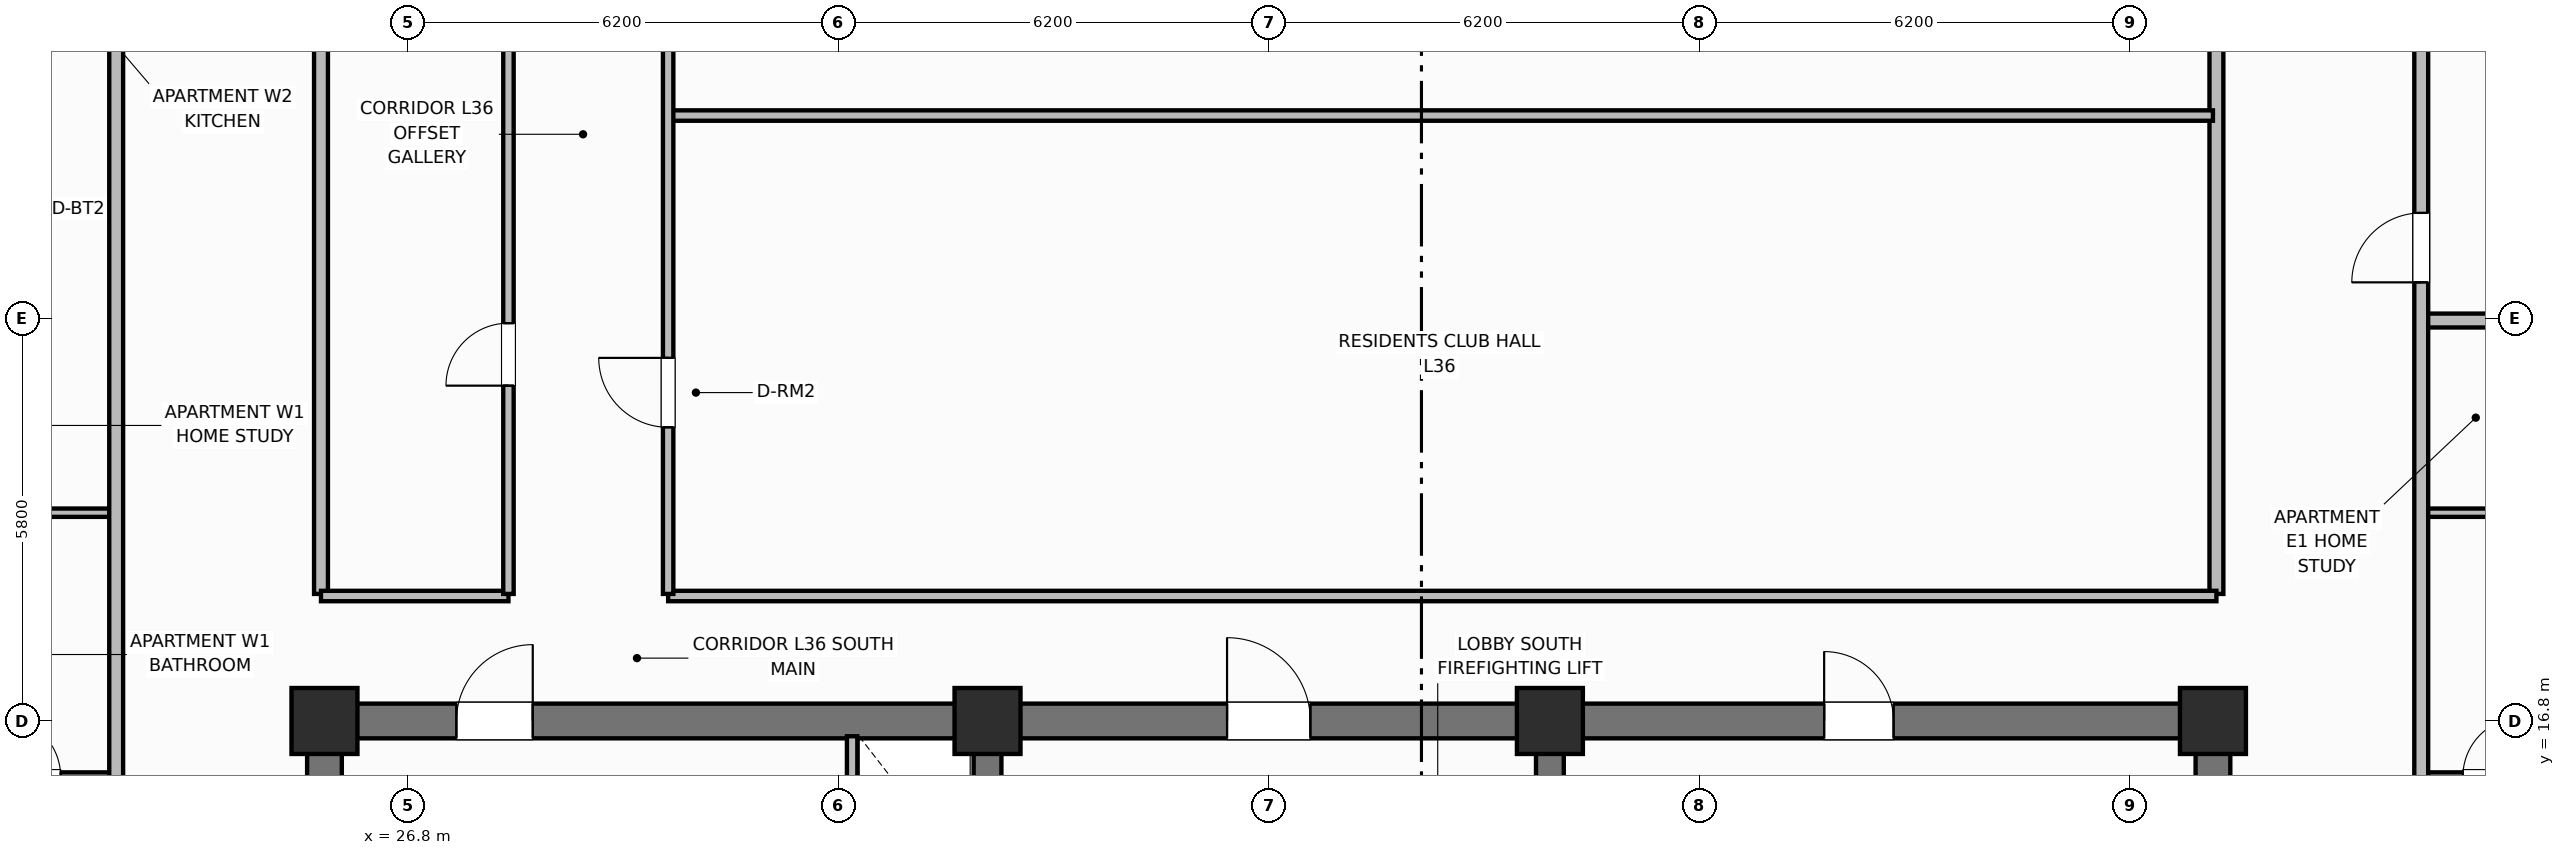
"""IFC4 building model, lengths in metres.
Left out: names, types, materials, properties, quantities, classifications, styles, units other than length and angle.
Written with IfcOpenShell. Run it as: python <this file> out.ifc"""

import sys

from ifc_helpers import new_model, si_unit, direction, frame, frame_2d, origin, origin_2d, place, context, subcontext, project, spatial, rectangle, extrude, element, fill, save


model = new_model("IFC4")
c1 = context("Model", 3, precision=1e-05, world=origin(), true_north=direction((0.0, 1.0)))
c2 = subcontext(c1, "Body", "Model", "MODEL_VIEW")
j1 = project(units=[si_unit("LENGTHUNIT", "METRE"), si_unit("PLANEANGLEUNIT", "RADIAN")], contexts=[c1])
p1 = place(None, origin())
s1 = spatial("IfcSite", under=j1, at=p1, CompositionType="ELEMENT")
p2 = place(p1, origin())
s2 = spatial("IfcBuilding", under=s1, at=p2, CompositionType="ELEMENT")
p3 = place(p2, frame((0.0, 0.0, 147.8)))
s3 = spatial("IfcBuildingStorey", under=s2, at=p3, CompositionType="ELEMENT", Elevation=147.8)
for number, where, z_axis, x_axis in (
    (1, (25.6, 10.85, 0.0), (0.0, 0.0, 1.0), (0.0, 1.0, 0.0)),
    (2, (52.8, 10.85, 0.0), (0.0, 0.0, 1.0), (0.0, 1.0, 0.0)),
):
    element("IfcWall", number, at=place(p3, frame(where, z_axis=z_axis, x_axis=x_axis)), inside=s3, PredefinedType="SHEAR", context=c2, shape_type="SweptSolid", body=[
        extrude(rectangle(XDim=5.7, YDim=0.5, at=frame_2d((2.85, 0.0))), origin(), (0.0, 0.0, 1.0), 3.7),
    ])
p4 = place(p3, frame((25.6, 16.8, 0.0), z_axis=(0.0, 0.0, 1.0), x_axis=(1.0, 0.0, 0.0)))
e3 = element("IfcWall", 3, at=p4, inside=s3, PredefinedType="SHEAR", context=c2, shape_type="SweptSolid", body=[
    extrude(rectangle(XDim=27.2, YDim=0.5, at=frame_2d((13.6, 0.0))), origin(), (0.0, 0.0, 1.0), 3.7),
])
p5 = place(p4, frame((1.9, 0.0, 0.0)))
e4 = element("IfcOpeningElement", 4, at=p5, cuts=e3, PredefinedType="OPENING", context=c2, shape_type="SweptSolid", body=[
    extrude(rectangle(XDim=1.1, YDim=2.15, at=frame_2d((0.55, 1.075))), frame((0.0, 0.26, 0.0), z_axis=(0.0, -1.0, 0.0), x_axis=(1.0, 0.0, 0.0)), (0.0, 0.0, 1.0), 0.52),
])
p6 = place(p4, frame((13.0, 0.0, 0.0)))
e5 = element("IfcOpeningElement", 5, at=p6, cuts=e3, PredefinedType="OPENING", context=c2, shape_type="SweptSolid", body=[
    extrude(rectangle(XDim=1.2, YDim=2.15, at=frame_2d((0.6, 1.075))), frame((0.0, 0.26, 0.0), z_axis=(0.0, -1.0, 0.0), x_axis=(1.0, 0.0, 0.0)), (0.0, 0.0, 1.0), 0.52),
])
p7 = place(p4, frame((21.6, 0.0, 0.0)))
e6 = element("IfcOpeningElement", 6, at=p7, cuts=e3, PredefinedType="OPENING", context=c2, shape_type="SweptSolid", body=[
    extrude(rectangle(XDim=1.0, YDim=2.15, at=frame_2d((0.5, 1.075))), frame((0.0, 0.26, 0.0), z_axis=(0.0, -1.0, 0.0), x_axis=(1.0, 0.0, 0.0)), (0.0, 0.0, 1.0), 0.52),
])
for number, where, z_axis, x_axis in (
    (7, (35.15, 10.85, 0.0), (0.0, 0.0, 1.0), (0.0, 1.0, 0.0)),
    (8, (43.25, 10.85, 0.0), (0.0, 0.0, 1.0), (0.0, 1.0, 0.0)),
):
    element("IfcWall", number, at=place(p3, frame(where, z_axis=z_axis, x_axis=x_axis)), inside=s3, PredefinedType="SHEAR", context=c2, shape_type="SweptSolid", body=[
        extrude(rectangle(XDim=5.7, YDim=0.4, at=frame_2d((2.85, 0.0))), origin(), (0.0, 0.0, 1.0), 3.7),
    ])
for number, where, z_axis, x_axis in (
    (9, (25.6, 16.8, 0.0), (0.0, 0.0, 1.0), (1.0, 0.0, 0.0)),
    (10, (35.15, 16.8, 0.0), (0.0, 0.0, 1.0), (1.0, 0.0, 0.0)),
    (11, (43.25, 16.8, 0.0), (0.0, 0.0, 1.0), (1.0, 0.0, 0.0)),
    (12, (52.8, 16.8, 0.0), (0.0, 0.0, 1.0), (1.0, 0.0, 0.0)),
):
    element("IfcColumn", number, at=place(p3, frame(where, z_axis=z_axis, x_axis=x_axis)), inside=s3, PredefinedType="COLUMN", context=c2, shape_type="SweptSolid", body=[
        extrude(rectangle(XDim=0.95, YDim=0.95, at=origin_2d()), origin(), (0.0, 0.0, 1.0), 3.7),
    ])
p8 = place(p3, frame((33.2, 14.5, 0.0), z_axis=(0.0, 0.0, 1.0), x_axis=(0.0, 1.0, 0.0)))
e13 = element("IfcWall", 13, at=p8, inside=s3, PredefinedType="PARTITIONING", context=c2, shape_type="SweptSolid", body=[
    extrude(rectangle(XDim=2.08, YDim=0.15, at=frame_2d((1.04, 0.0))), origin(), (0.0, 0.0, 1.0), 2.55),
])
p9 = place(p8, frame((0.55, 0.0, 0.0)))
e14 = element("IfcOpeningElement", 14, at=p9, cuts=e13, PredefinedType="OPENING", context=c2, shape_type="SweptSolid", body=[
    extrude(rectangle(XDim=0.85, YDim=2.05, at=frame_2d((0.425, 1.025))), frame((0.0, 0.085, 0.0), z_axis=(0.0, -1.0, 0.0), x_axis=(1.0, 0.0, 0.0)), (0.0, 0.0, 1.0), 0.17),
])
for number, where, z_axis, x_axis in (
    (15, (25.55, 18.63, 0.0), (0.0, 0.0, 1.0), (0.0, 1.0, 0.0)),
    (16, (52.85, 18.63, 0.0), (0.0, 0.0, 1.0), (0.0, 1.0, 0.0)),
):
    element("IfcWall", number, at=place(p3, frame(where, z_axis=z_axis, x_axis=x_axis)), inside=s3, PredefinedType="PARTITIONING", context=c2, shape_type="SweptSolid", body=[
        extrude(rectangle(XDim=19.14, YDim=0.2, at=frame_2d((9.57, 0.0))), origin(), (0.0, 0.0, 1.0), 2.55),
    ])
p10 = place(p3, frame((25.55, 18.6, 0.0), z_axis=(0.0, 0.0, 1.0), x_axis=(1.0, 0.0, 0.0)))
e17 = element("IfcWall", 17, at=p10, inside=s3, PredefinedType="PARTITIONING", context=c2, shape_type="SweptSolid", body=[
    extrude(rectangle(XDim=2.7, YDim=0.15, at=frame_2d((1.35, 0.0))), origin(), (0.0, 0.0, 1.0), 2.55),
])
p11 = place(p3, frame((30.55, 18.6, 0.0), z_axis=(0.0, 0.0, 1.0), x_axis=(1.0, 0.0, 0.0)))
e18 = element("IfcWall", 18, at=p11, inside=s3, PredefinedType="PARTITIONING", context=c2, shape_type="SweptSolid", body=[
    extrude(rectangle(XDim=22.3, YDim=0.15, at=frame_2d((11.15, 0.0))), origin(), (0.0, 0.0, 1.0), 2.55),
])
p12 = place(p3, frame((30.58, 25.521, 0.0), z_axis=(0.0, 0.0, 1.0), x_axis=(1.0, 0.0, 0.0)))
e19 = element("IfcWall", 19, at=p12, inside=s3, PredefinedType="PARTITIONING", context=c2, shape_type="SweptSolid", body=[
    extrude(rectangle(XDim=22.22, YDim=0.15, at=frame_2d((11.11, 0.0))), origin(), (0.0, 0.0, 1.0), 2.55),
])
p13 = place(p3, frame((28.25, 18.63, 0.0), z_axis=(0.0, 0.0, 1.0), x_axis=(0.0, 1.0, 0.0)))
e20 = element("IfcWall", 20, at=p13, inside=s3, PredefinedType="PARTITIONING", context=c2, shape_type="SweptSolid", body=[
    extrude(rectangle(XDim=19.14, YDim=0.15, at=frame_2d((9.57, 0.0))), origin(), (0.0, 0.0, 1.0), 2.55),
])
p14 = place(p13, frame((3.0, 0.0, 0.0)))
e21 = element("IfcOpeningElement", 21, at=p14, cuts=e20, PredefinedType="OPENING", context=c2, shape_type="SweptSolid", body=[
    extrude(rectangle(XDim=0.9, YDim=2.1, at=frame_2d((0.45, 1.05))), frame((0.0, 0.085, 0.0), z_axis=(0.0, -1.0, 0.0), x_axis=(1.0, 0.0, 0.0)), (0.0, 0.0, 1.0), 0.17),
])
p15 = place(p13, frame((11.5, 0.0, 0.0)))
e22 = element("IfcOpeningElement", 22, at=p15, cuts=e20, PredefinedType="OPENING", context=c2, shape_type="SweptSolid", body=[
    extrude(rectangle(XDim=0.9, YDim=2.1, at=frame_2d((0.45, 1.05))), frame((0.0, 0.085, 0.0), z_axis=(0.0, -1.0, 0.0), x_axis=(1.0, 0.0, 0.0)), (0.0, 0.0, 1.0), 0.17),
])
p16 = place(p3, frame((30.55, 18.63, 0.0), z_axis=(0.0, 0.0, 1.0), x_axis=(0.0, 1.0, 0.0)))
e23 = element("IfcWall", 23, at=p16, inside=s3, PredefinedType="PARTITIONING", context=c2, shape_type="SweptSolid", body=[
    extrude(rectangle(XDim=19.14, YDim=0.15, at=frame_2d((9.57, 0.0))), origin(), (0.0, 0.0, 1.0), 2.55),
])
p17 = place(p16, frame((2.4, 0.0, 0.0)))
e24 = element("IfcOpeningElement", 24, at=p17, cuts=e23, PredefinedType="OPENING", context=c2, shape_type="SweptSolid", body=[
    extrude(rectangle(XDim=1.0, YDim=2.15, at=frame_2d((0.5, 1.075))), frame((0.0, 0.085, 0.0), z_axis=(0.0, -1.0, 0.0), x_axis=(1.0, 0.0, 0.0)), (0.0, 0.0, 1.0), 0.17),
])
p18 = place(p16, frame((8.89, 0.0, 0.0)))
e25 = element("IfcOpeningElement", 25, at=p18, cuts=e23, PredefinedType="OPENING", context=c2, shape_type="SweptSolid", body=[
    extrude(rectangle(XDim=1.0, YDim=2.15, at=frame_2d((0.5, 1.075))), frame((0.0, 0.085, 0.0), z_axis=(0.0, -1.0, 0.0), x_axis=(1.0, 0.0, 0.0)), (0.0, 0.0, 1.0), 0.17),
])
p19 = place(p3, frame((20.35, 16.0, 0.0), z_axis=(0.0, 0.0, 1.0), x_axis=(1.0, 0.0, 0.0)))
e26 = element("IfcWall", 26, at=p19, inside=s3, PredefinedType="PARTITIONING", context=c2, shape_type="SweptSolid", body=[
    extrude(rectangle(XDim=2.25, YDim=0.12, at=frame_2d((1.125, 0.0))), origin(), (0.0, 0.0, 1.0), 2.55),
])
p20 = place(p19, frame((0.6, 0.0, 0.0)))
e27 = element("IfcOpeningElement", 27, at=p20, cuts=e26, PredefinedType="OPENING", context=c2, shape_type="SweptSolid", body=[
    extrude(rectangle(XDim=0.85, YDim=2.1, at=frame_2d((0.425, 1.05))), frame((0.0, 0.07, 0.0), z_axis=(0.0, -1.0, 0.0), x_axis=(1.0, 0.0, 0.0)), (0.0, 0.0, 1.0), 0.14),
])
p21 = place(p3, frame((20.35, 19.8, 0.0), z_axis=(0.0, 0.0, 1.0), x_axis=(1.0, 0.0, 0.0)))
e28 = element("IfcWall", 28, at=p21, inside=s3, PredefinedType="PARTITIONING", context=c2, shape_type="SweptSolid", body=[
    extrude(rectangle(XDim=2.25, YDim=0.12, at=frame_2d((1.125, 0.0))), origin(), (0.0, 0.0, 1.0), 2.55),
])
p22 = place(p3, frame((22.6, 10.6, 0.0), z_axis=(0.0, 0.0, 1.0), x_axis=(0.0, 1.0, 0.0)))
e29 = element("IfcWall", 29, at=p22, inside=s3, PredefinedType="PARTITIONING", context=c2, shape_type="SweptSolid", body=[
    extrude(rectangle(XDim=35.2, YDim=0.2, at=frame_2d((17.6, 0.0))), origin(), (0.0, 0.0, 1.0), 2.55),
])
p23 = place(p22, frame((2.65, 0.0, 0.0)))
e30 = element("IfcOpeningElement", 30, at=p23, cuts=e29, PredefinedType="OPENING", context=c2, shape_type="SweptSolid", body=[
    extrude(rectangle(XDim=1.0, YDim=2.15, at=frame_2d((0.5, 1.075))), frame((0.0, 0.11, 0.0), z_axis=(0.0, -1.0, 0.0), x_axis=(1.0, 0.0, 0.0)), (0.0, 0.0, 1.0), 0.22),
])
p24 = place(p22, frame((19.95, 0.0, 0.0)))
e31 = element("IfcOpeningElement", 31, at=p24, cuts=e29, PredefinedType="OPENING", context=c2, shape_type="SweptSolid", body=[
    extrude(rectangle(XDim=1.0, YDim=2.15, at=frame_2d((0.5, 1.075))), frame((0.0, 0.11, 0.0), z_axis=(0.0, -1.0, 0.0), x_axis=(1.0, 0.0, 0.0)), (0.0, 0.0, 1.0), 0.22),
])
p25 = place(p3, frame((55.8, 16.0, 0.0), z_axis=(0.0, 0.0, 1.0), x_axis=(1.0, 0.0, 0.0)))
e32 = element("IfcWall", 32, at=p25, inside=s3, PredefinedType="PARTITIONING", context=c2, shape_type="SweptSolid", body=[
    extrude(rectangle(XDim=2.25, YDim=0.12, at=frame_2d((1.125, 0.0))), origin(), (0.0, 0.0, 1.0), 2.55),
])
p26 = place(p25, frame((0.6, 0.0, 0.0)))
e33 = element("IfcOpeningElement", 33, at=p26, cuts=e32, PredefinedType="OPENING", context=c2, shape_type="SweptSolid", body=[
    extrude(rectangle(XDim=0.85, YDim=2.1, at=frame_2d((0.425, 1.05))), frame((0.0, 0.07, 0.0), z_axis=(0.0, -1.0, 0.0), x_axis=(1.0, 0.0, 0.0)), (0.0, 0.0, 1.0), 0.14),
])
p27 = place(p3, frame((55.8, 19.8, 0.0), z_axis=(0.0, 0.0, 1.0), x_axis=(1.0, 0.0, 0.0)))
e34 = element("IfcWall", 34, at=p27, inside=s3, PredefinedType="PARTITIONING", context=c2, shape_type="SweptSolid", body=[
    extrude(rectangle(XDim=2.25, YDim=0.12, at=frame_2d((1.125, 0.0))), origin(), (0.0, 0.0, 1.0), 2.55),
])
p28 = place(p3, frame((55.8, 22.568, 0.0), z_axis=(0.0, 0.0, 1.0), x_axis=(1.0, 0.0, 0.0)))
e35 = element("IfcWall", 35, at=p28, inside=s3, PredefinedType="PARTITIONING", context=c2, shape_type="SweptSolid", body=[
    extrude(rectangle(XDim=6.03, YDim=0.2, at=frame_2d((3.015, 0.0))), origin(), (0.0, 0.0, 1.0), 2.55),
])
p29 = place(p3, frame((55.8, 10.6, 0.0), z_axis=(0.0, 0.0, 1.0), x_axis=(0.0, 1.0, 0.0)))
e36 = element("IfcWall", 36, at=p29, inside=s3, PredefinedType="PARTITIONING", context=c2, shape_type="SweptSolid", body=[
    extrude(rectangle(XDim=35.2, YDim=0.2, at=frame_2d((17.6, 0.0))), origin(), (0.0, 0.0, 1.0), 2.55),
])
p30 = place(p29, frame((2.65, 0.0, 0.0)))
e37 = element("IfcOpeningElement", 37, at=p30, cuts=e36, PredefinedType="OPENING", context=c2, shape_type="SweptSolid", body=[
    extrude(rectangle(XDim=1.0, YDim=2.15, at=frame_2d((0.5, 1.075))), frame((0.0, 0.11, 0.0), z_axis=(0.0, -1.0, 0.0), x_axis=(1.0, 0.0, 0.0)), (0.0, 0.0, 1.0), 0.22),
])
p31 = place(p29, frame((12.518, 0.0, 0.0)))
e38 = element("IfcOpeningElement", 38, at=p31, cuts=e36, PredefinedType="OPENING", context=c2, shape_type="SweptSolid", body=[
    extrude(rectangle(XDim=1.0, YDim=2.15, at=frame_2d((0.5, 1.075))), frame((0.0, 0.11, 0.0), z_axis=(0.0, -1.0, 0.0), x_axis=(1.0, 0.0, 0.0)), (0.0, 0.0, 1.0), 0.22),
])
p32 = place(p29, frame((23.65, 0.0, 0.0)))
e39 = element("IfcOpeningElement", 39, at=p32, cuts=e36, PredefinedType="OPENING", context=c2, shape_type="SweptSolid", body=[
    extrude(rectangle(XDim=1.0, YDim=2.15, at=frame_2d((0.5, 1.075))), frame((0.0, 0.11, 0.0), z_axis=(0.0, -1.0, 0.0), x_axis=(1.0, 0.0, 0.0)), (0.0, 0.0, 1.0), 0.22),
])
p33 = place(p14, origin())
e40 = element("IfcDoor", 40, at=p33, inside=s3, OperationType="SINGLE_SWING_LEFT", PredefinedType="DOOR", context=c2, shape_type="SweptSolid", body=[
    extrude(rectangle(XDim=0.9, YDim=2.1, at=frame_2d((0.45, 1.05))), frame((0.0, 0.025, 0.0), z_axis=(0.0, -1.0, 0.0), x_axis=(1.0, 0.0, 0.0)), (0.0, 0.0, 1.0), 0.05),
])
fill(e21, e40)
p34 = place(p17, origin())
e41 = element("IfcDoor", 41, at=p34, inside=s3, OperationType="SINGLE_SWING_RIGHT", PredefinedType="DOOR", context=c2, shape_type="SweptSolid", body=[
    extrude(rectangle(XDim=1.0, YDim=2.15, at=frame_2d((0.5, 1.075))), frame((0.0, 0.025, 0.0), z_axis=(0.0, -1.0, 0.0), x_axis=(1.0, 0.0, 0.0)), (0.0, 0.0, 1.0), 0.05),
])
fill(e24, e41)
p35 = place(p20, origin())
e42 = element("IfcDoor", 42, at=p35, inside=s3, OperationType="SINGLE_SWING_LEFT", PredefinedType="DOOR", context=c2, shape_type="SweptSolid", body=[
    extrude(rectangle(XDim=0.85, YDim=2.1, at=frame_2d((0.425, 1.05))), frame((0.0, 0.025, 0.0), z_axis=(0.0, -1.0, 0.0), x_axis=(1.0, 0.0, 0.0)), (0.0, 0.0, 1.0), 0.05),
])
fill(e27, e42)
p36 = place(p26, origin())
e43 = element("IfcDoor", 43, at=p36, inside=s3, OperationType="SINGLE_SWING_RIGHT", PredefinedType="DOOR", context=c2, shape_type="SweptSolid", body=[
    extrude(rectangle(XDim=0.85, YDim=2.1, at=frame_2d((0.425, 1.05))), frame((0.0, 0.025, 0.0), z_axis=(0.0, -1.0, 0.0), x_axis=(1.0, 0.0, 0.0)), (0.0, 0.0, 1.0), 0.05),
])
fill(e33, e43)
p37 = place(p31, origin())
e44 = element("IfcDoor", 44, at=p37, inside=s3, OperationType="SINGLE_SWING_LEFT", PredefinedType="DOOR", context=c2, shape_type="SweptSolid", body=[
    extrude(rectangle(XDim=1.0, YDim=2.15, at=frame_2d((0.5, 1.075))), frame((0.0, 0.025, 0.0), z_axis=(0.0, -1.0, 0.0), x_axis=(1.0, 0.0, 0.0)), (0.0, 0.0, 1.0), 0.05),
])
fill(e38, e44)
p38 = place(p5, origin())
e45 = element("IfcDoor", 45, at=p38, inside=s3, OperationType="SINGLE_SWING_RIGHT", PredefinedType="DOOR", context=c2, shape_type="SweptSolid", body=[
    extrude(rectangle(XDim=1.1, YDim=2.15, at=frame_2d((0.55, 1.075))), frame((0.0, 0.025, 0.0), z_axis=(0.0, -1.0, 0.0), x_axis=(1.0, 0.0, 0.0)), (0.0, 0.0, 1.0), 0.05),
])
fill(e4, e45)
p39 = place(p6, origin())
e46 = element("IfcDoor", 46, at=p39, inside=s3, OperationType="SINGLE_SWING_LEFT", PredefinedType="DOOR", context=c2, shape_type="SweptSolid", body=[
    extrude(rectangle(XDim=1.2, YDim=2.15, at=frame_2d((0.6, 1.075))), frame((0.0, 0.025, 0.0), z_axis=(0.0, -1.0, 0.0), x_axis=(1.0, 0.0, 0.0)), (0.0, 0.0, 1.0), 0.05),
])
fill(e5, e46)
p40 = place(p7, origin())
e47 = element("IfcDoor", 47, at=p40, inside=s3, OperationType="SINGLE_SWING_LEFT", PredefinedType="DOOR", context=c2, shape_type="SweptSolid", body=[
    extrude(rectangle(XDim=1.0, YDim=2.15, at=frame_2d((0.5, 1.075))), frame((0.0, 0.025, 0.0), z_axis=(0.0, -1.0, 0.0), x_axis=(1.0, 0.0, 0.0)), (0.0, 0.0, 1.0), 0.05),
])
fill(e6, e47)
save(model, sys.argv[1])
